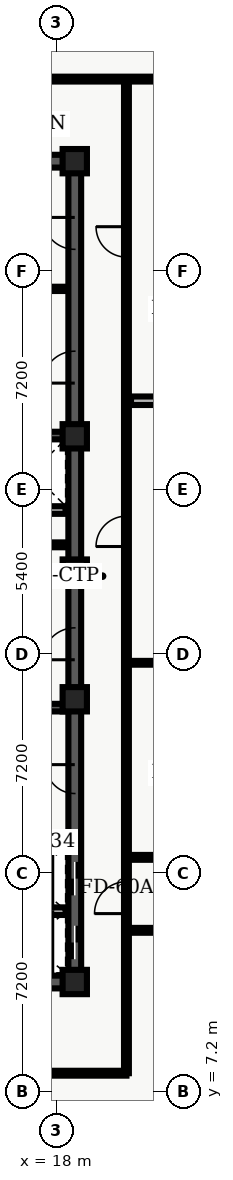
"""IFC4 building model, lengths in metres.
Left out: names, types, materials, properties, quantities, classifications, styles, units other than length and angle.
Written with IfcOpenShell. Run it as: python <this file> out.ifc"""

import sys

from ifc_helpers import new_model, entity, si_unit, converted_unit, direction, frame, origin_with_axes, origin_2d_with_axis, place, context, subcontext, project, spatial, polyline, rectangle, outline, extrude, element, fill, save


model = new_model("IFC4")
c1 = context("Model", 3, precision=1e-05, world=origin_with_axes(), true_north=direction((0.0, 1.0)))
c2 = subcontext(c1, "Body", "Model", "MODEL_VIEW")
j1 = project(units=[si_unit("LENGTHUNIT", "METRE"), converted_unit("PLANEANGLEUNIT", "DEGREE", entity("IfcPlaneAngleMeasure", 0.017), si_unit("PLANEANGLEUNIT", "RADIAN"), dimensions=[0, 0, 0, 0, 0, 0, 0])], contexts=[c1])
p1 = place(None, origin_with_axes())
s1 = spatial("IfcSite", under=j1, at=p1, CompositionType="ELEMENT")
p2 = place(p1, origin_with_axes())
s2 = spatial("IfcBuilding", under=s1, at=p2, CompositionType="ELEMENT")
p3 = place(p2, frame((0.0, 0.0, 252.9), z_axis=(0.0, 0.0, 1.0), x_axis=(1.0, 0.0, 0.0)))
s3 = spatial("IfcBuildingStorey", under=s2, at=p3, CompositionType="ELEMENT", Elevation=252.9)
p4 = place(p3, frame((11.4, 10.8, 0.0), z_axis=(0.0, 0.0, 1.0), x_axis=(1.0, 0.0, 0.0)))
e1 = element("IfcWall", 1, at=p4, inside=s3, PredefinedType="SHEAR", context=c2, shape_type="SweptSolid", body=[
    extrude(outline(polyline([(0.0, -0.21), (7.2, -0.21), (7.2, 0.21), (0.0, 0.21), (0.0, -0.21)])), origin_with_axes(), (0.0, 0.0, 1.0), 3.66),
])
p5 = place(p4, frame((2.625, 0.0, 0.0), z_axis=(0.0, 0.0, 1.0), x_axis=(1.0, 0.0, 0.0)))
e2 = element("IfcOpeningElement", 2, at=p5, cuts=e1, PredefinedType="OPENING", context=c2, shape_type="SweptSolid", body=[
    extrude(rectangle(XDim=1.05, YDim=0.44, at=origin_2d_with_axis()), origin_with_axes(), (0.0, 0.0, 1.0), 2.15),
])
p6 = place(p3, frame((11.4, 37.8, 0.0), z_axis=(0.0, 0.0, 1.0), x_axis=(1.0, 0.0, 0.0)))
e3 = element("IfcWall", 3, at=p6, inside=s3, PredefinedType="SHEAR", context=c2, shape_type="SweptSolid", body=[
    extrude(outline(polyline([(0.0, -0.21), (7.2, -0.21), (7.2, 0.21), (0.0, 0.21), (0.0, -0.21)])), origin_with_axes(), (0.0, 0.0, 1.0), 3.66),
])
p7 = place(p6, frame((2.625, 0.0, 0.0), z_axis=(0.0, 0.0, 1.0), x_axis=(1.0, 0.0, 0.0)))
e4 = element("IfcOpeningElement", 4, at=p7, cuts=e3, PredefinedType="OPENING", context=c2, shape_type="SweptSolid", body=[
    extrude(rectangle(XDim=1.05, YDim=0.44, at=origin_2d_with_axis()), origin_with_axes(), (0.0, 0.0, 1.0), 2.15),
])
p8 = place(p3, frame((18.6, 10.8, 0.0), z_axis=(0.0, 0.0, 1.0), x_axis=(0.0, 1.0, 0.0)))
e5 = element("IfcWall", 5, at=p8, inside=s3, PredefinedType="SHEAR", context=c2, shape_type="SweptSolid", body=[
    extrude(outline(polyline([(0.0, -0.21), (13.5, -0.21), (13.5, 0.21), (0.0, 0.21), (0.0, -0.21)])), origin_with_axes(), (0.0, 0.0, 1.0), 3.66),
])
p9 = place(p8, frame((1.3, 0.0, 0.0), z_axis=(0.0, 0.0, 1.0), x_axis=(1.0, 0.0, 0.0)))
e6 = element("IfcOpeningElement", 6, at=p9, cuts=e5, PredefinedType="OPENING", context=c2, shape_type="SweptSolid", body=[
    extrude(rectangle(XDim=1.1, YDim=0.44, at=origin_2d_with_axis()), origin_with_axes(), (0.0, 0.0, 1.0), 2.15),
])
p10 = place(p8, frame((3.4, 0.0, 0.0), z_axis=(0.0, 0.0, 1.0), x_axis=(1.0, 0.0, 0.0)))
e7 = element("IfcOpeningElement", 7, at=p10, cuts=e5, PredefinedType="OPENING", context=c2, shape_type="SweptSolid", body=[
    extrude(rectangle(XDim=1.1, YDim=0.44, at=origin_2d_with_axis()), origin_with_axes(), (0.0, 0.0, 1.0), 2.15),
])
p11 = place(p8, frame((11.125, 0.0, 0.0), z_axis=(0.0, 0.0, 1.0), x_axis=(1.0, 0.0, 0.0)))
e8 = element("IfcOpeningElement", 8, at=p11, cuts=e5, PredefinedType="OPENING", context=c2, shape_type="SweptSolid", body=[
    extrude(rectangle(XDim=1.05, YDim=0.44, at=origin_2d_with_axis()), origin_with_axes(), (0.0, 0.0, 1.0), 2.15),
])
p12 = place(p8, frame((6.675, 0.0, 0.0), z_axis=(0.0, 0.0, 1.0), x_axis=(1.0, 0.0, 0.0)))
e9 = element("IfcOpeningElement", 9, at=p12, cuts=e5, PredefinedType="OPENING", context=c2, shape_type="SweptSolid", body=[
    extrude(rectangle(XDim=0.95, YDim=0.44, at=origin_2d_with_axis()), origin_with_axes(), (0.0, 0.0, 1.0), 2.15),
])
p13 = place(p3, frame((18.6, 24.3, 0.0), z_axis=(0.0, 0.0, 1.0), x_axis=(0.0, 1.0, 0.0)))
e10 = element("IfcWall", 10, at=p13, inside=s3, PredefinedType="SHEAR", context=c2, shape_type="SweptSolid", body=[
    extrude(outline(polyline([(0.0, -0.21), (13.5, -0.21), (13.5, 0.21), (0.0, 0.21), (0.0, -0.21)])), origin_with_axes(), (0.0, 0.0, 1.0), 3.66),
])
p14 = place(p13, frame((6.725, 0.0, 0.0), z_axis=(0.0, 0.0, 1.0), x_axis=(1.0, 0.0, 0.0)))
e11 = element("IfcOpeningElement", 11, at=p14, cuts=e10, PredefinedType="OPENING", context=c2, shape_type="SweptSolid", body=[
    extrude(rectangle(XDim=1.05, YDim=0.44, at=origin_2d_with_axis()), origin_with_axes(), (0.0, 0.0, 1.0), 2.15),
])
p15 = place(p13, frame((11.125, 0.0, 0.0), z_axis=(0.0, 0.0, 1.0), x_axis=(1.0, 0.0, 0.0)))
e12 = element("IfcOpeningElement", 12, at=p15, cuts=e10, PredefinedType="OPENING", context=c2, shape_type="SweptSolid", body=[
    extrude(rectangle(XDim=1.05, YDim=0.44, at=origin_2d_with_axis()), origin_with_axes(), (0.0, 0.0, 1.0), 2.15),
])
for number, where, z_axis, x_axis in (
    (13, (11.61, 19.825, 0.0), (0.0, 0.0, 1.0), (1.0, 0.0, 0.0)),
    (14, (11.61, 28.775, 0.0), (0.0, 0.0, 1.0), (1.0, 0.0, 0.0)),
):
    element("IfcWall", number, at=place(p3, frame(where, z_axis=z_axis, x_axis=x_axis)), inside=s3, PredefinedType="SHEAR", context=c2, shape_type="SweptSolid", body=[
        extrude(outline(polyline([(0.0, -0.125), (6.78, -0.125), (6.78, 0.125), (0.0, 0.125), (0.0, -0.125)])), origin_with_axes(), (0.0, 0.0, 1.0), 3.66),
    ])
p16 = place(p3, frame((11.7, 24.1, 0.0), z_axis=(0.0, 0.0, 1.0), x_axis=(1.0, 0.0, 0.0)))
e15 = element("IfcWall", 15, at=p16, inside=s3, PredefinedType="SOLIDWALL", context=c2, shape_type="SweptSolid", body=[
    extrude(outline(polyline([(0.0, -0.125), (6.6, -0.125), (6.6, 0.125), (0.0, 0.125), (0.0, -0.125)])), origin_with_axes(), (0.0, 0.0, 1.0), 2.7),
])
p17 = place(p16, frame((3.75, 0.0, 0.0), z_axis=(0.0, 0.0, 1.0), x_axis=(1.0, 0.0, 0.0)))
e16 = element("IfcOpeningElement", 16, at=p17, cuts=e15, PredefinedType="OPENING", context=c2, shape_type="SweptSolid", body=[
    extrude(rectangle(XDim=0.9, YDim=0.27, at=origin_2d_with_axis()), origin_with_axes(), (0.0, 0.0, 1.0), 2.15),
])
p18 = place(p3, frame((11.7, 26.325, 0.0), z_axis=(0.0, 0.0, 1.0), x_axis=(1.0, 0.0, 0.0)))
e17 = element("IfcWall", 17, at=p18, inside=s3, PredefinedType="SOLIDWALL", context=c2, shape_type="SweptSolid", body=[
    extrude(outline(polyline([(0.0, -0.125), (6.6, -0.125), (6.6, 0.125), (0.0, 0.125), (0.0, -0.125)])), origin_with_axes(), (0.0, 0.0, 1.0), 2.7),
])
p19 = place(p18, frame((3.5, 0.0, 0.0), z_axis=(0.0, 0.0, 1.0), x_axis=(1.0, 0.0, 0.0)))
e18 = element("IfcOpeningElement", 18, at=p19, cuts=e17, PredefinedType="OPENING", context=c2, shape_type="SweptSolid", body=[
    extrude(rectangle(XDim=0.9, YDim=0.27, at=origin_2d_with_axis()), origin_with_axes(), (0.0, 0.0, 1.0), 2.15),
])
for number, where, z_axis, x_axis in (
    (19, (18.6, 10.8, 0.0), (0.0, 0.0, 1.0), (1.0, 0.0, 0.0)),
    (20, (18.6, 20.1, 0.0), (0.0, 0.0, 1.0), (1.0, 0.0, 0.0)),
    (21, (18.6, 24.3, 0.0), (0.0, 0.0, 1.0), (1.0, 0.0, 0.0)),
    (22, (18.6, 28.75, 0.0), (0.0, 0.0, 1.0), (1.0, 0.0, 0.0)),
    (23, (18.6, 37.8, 0.0), (0.0, 0.0, 1.0), (1.0, 0.0, 0.0)),
):
    element("IfcColumn", number, at=place(p3, frame(where, z_axis=z_axis, x_axis=x_axis)), inside=s3, PredefinedType="COLUMN", context=c2, shape_type="SweptSolid", body=[
        extrude(rectangle(XDim=0.8, YDim=0.8, at=origin_2d_with_axis()), origin_with_axes(), (0.0, 0.0, 1.0), 3.9),
    ])
p20 = place(p3, frame((14.62, 25.18, 0.0), z_axis=(0.0, 0.0, 1.0), x_axis=(1.0, 0.0, 0.0)))
e24 = element("IfcWall", 24, at=p20, inside=s3, PredefinedType="PARTITIONING", context=c2, shape_type="SweptSolid", body=[
    extrude(outline(polyline([(0.0, -0.08), (3.68, -0.08), (3.68, 0.08), (0.0, 0.08), (0.0, -0.08)])), origin_with_axes(), (0.0, 0.0, 1.0), 2.7),
])
p21 = place(p20, frame((1.95, 0.0, 0.0), z_axis=(0.0, 0.0, 1.0), x_axis=(1.0, 0.0, 0.0)))
e25 = element("IfcOpeningElement", 25, at=p21, cuts=e24, PredefinedType="OPENING", context=c2, shape_type="SweptSolid", body=[
    extrude(rectangle(XDim=0.9, YDim=0.18, at=origin_2d_with_axis()), origin_with_axes(), (0.0, 0.0, 1.0), 2.15),
])
for number, where, z_axis, x_axis in (
    (26, (15.84, 13.13, 0.0), (0.0, 0.0, 1.0), (1.0, 0.0, 0.0)),
    (27, (15.84, 15.27, 0.0), (0.0, 0.0, 1.0), (1.0, 0.0, 0.0)),
):
    element("IfcWall", number, at=place(p3, frame(where, z_axis=z_axis, x_axis=x_axis)), inside=s3, PredefinedType="SOLIDWALL", context=c2, shape_type="SweptSolid", body=[
        extrude(outline(polyline([(0.0, -0.125), (2.46, -0.125), (2.46, 0.125), (0.0, 0.125), (0.0, -0.125)])), origin_with_axes(), (0.0, 0.0, 1.0), 2.7),
    ])
p22 = place(p3, frame((15.84, 33.6, 0.0), z_axis=(0.0, 0.0, 1.0), x_axis=(1.0, 0.0, 0.0)))
e28 = element("IfcWall", 28, at=p22, inside=s3, PredefinedType="PARTITIONING", context=c2, shape_type="SweptSolid", body=[
    extrude(outline(polyline([(0.0, -0.07), (2.46, -0.07), (2.46, 0.07), (0.0, 0.07), (0.0, -0.07)])), origin_with_axes(), (0.0, 0.0, 1.0), 2.7),
])
p23 = place(p3, frame((8.135, 7.8, 0.0), z_axis=(0.0, 0.0, 1.0), x_axis=(1.0, 0.0, 0.0)))
e29 = element("IfcWall", 29, at=p23, inside=s3, PredefinedType="PARTITIONING", context=c2, shape_type="SweptSolid", body=[
    extrude(outline(polyline([(0.0, -0.08), (12.165, -0.08), (12.165, 0.08), (0.0, 0.08), (0.0, -0.08)])), origin_with_axes(), (0.0, 0.0, 1.0), 2.7),
])
p24 = place(p23, frame((3.979, 0.0, 0.0), z_axis=(0.0, 0.0, 1.0), x_axis=(1.0, 0.0, 0.0)))
e30 = element("IfcOpeningElement", 30, at=p24, cuts=e29, PredefinedType="OPENING", context=c2, shape_type="SweptSolid", body=[
    extrude(rectangle(XDim=1.0, YDim=0.18, at=origin_2d_with_axis()), origin_with_axes(), (0.0, 0.0, 1.0), 2.15),
])
p25 = place(p23, frame((8.778, 0.0, 0.0), z_axis=(0.0, 0.0, 1.0), x_axis=(1.0, 0.0, 0.0)))
e31 = element("IfcOpeningElement", 31, at=p25, cuts=e29, PredefinedType="OPENING", context=c2, shape_type="SweptSolid", body=[
    extrude(rectangle(XDim=1.0, YDim=0.18, at=origin_2d_with_axis()), origin_with_axes(), (0.0, 0.0, 1.0), 2.15),
])
p26 = place(p3, frame((8.135, 40.5, 0.0), z_axis=(0.0, 0.0, 1.0), x_axis=(1.0, 0.0, 0.0)))
e32 = element("IfcWall", 32, at=p26, inside=s3, PredefinedType="PARTITIONING", context=c2, shape_type="SweptSolid", body=[
    extrude(outline(polyline([(0.0, -0.08), (23.93, -0.08), (23.93, 0.08), (0.0, 0.08), (0.0, -0.08)])), origin_with_axes(), (0.0, 0.0, 1.0), 2.7),
])
p27 = place(p26, frame((0.76, 0.0, 0.0), z_axis=(0.0, 0.0, 1.0), x_axis=(1.0, 0.0, 0.0)))
e33 = element("IfcOpeningElement", 33, at=p27, cuts=e32, PredefinedType="OPENING", context=c2, shape_type="SweptSolid", body=[
    extrude(rectangle(XDim=1.0, YDim=0.18, at=origin_2d_with_axis()), origin_with_axes(), (0.0, 0.0, 1.0), 2.15),
])
p28 = place(p26, frame((7.625, 0.0, 0.0), z_axis=(0.0, 0.0, 1.0), x_axis=(1.0, 0.0, 0.0)))
e34 = element("IfcOpeningElement", 34, at=p28, cuts=e32, PredefinedType="OPENING", context=c2, shape_type="SweptSolid", body=[
    extrude(rectangle(XDim=1.0, YDim=0.18, at=origin_2d_with_axis()), origin_with_axes(), (0.0, 0.0, 1.0), 2.15),
])
p29 = place(p3, frame((20.3, 7.8, 0.0), z_axis=(0.0, 0.0, 1.0), x_axis=(0.0, 1.0, 0.0)))
e35 = element("IfcWall", 35, at=p29, inside=s3, PredefinedType="PARTITIONING", context=c2, shape_type="SweptSolid", body=[
    extrude(outline(polyline([(0.0, -0.08), (32.7, -0.08), (32.7, 0.08), (0.0, 0.08), (0.0, -0.08)])), origin_with_axes(), (0.0, 0.0, 1.0), 2.7),
])
p30 = place(p29, frame((17.825, 0.0, 0.0), z_axis=(0.0, 0.0, 1.0), x_axis=(1.0, 0.0, 0.0)))
e36 = element("IfcOpeningElement", 36, at=p30, cuts=e35, PredefinedType="OPENING", context=c2, shape_type="SweptSolid", body=[
    extrude(rectangle(XDim=1.0, YDim=0.18, at=origin_2d_with_axis()), origin_with_axes(), (0.0, 0.0, 1.0), 2.15),
])
p31 = place(p29, frame((27.345, 0.0, 0.0), z_axis=(0.0, 0.0, 1.0), x_axis=(1.0, 0.0, 0.0)))
e37 = element("IfcOpeningElement", 37, at=p31, cuts=e35, PredefinedType="OPENING", context=c2, shape_type="SweptSolid", body=[
    extrude(rectangle(XDim=1.0, YDim=0.18, at=origin_2d_with_axis()), origin_with_axes(), (0.0, 0.0, 1.0), 2.15),
])
p32 = place(p29, frame((5.775, 0.0, 0.0), z_axis=(0.0, 0.0, 1.0), x_axis=(1.0, 0.0, 0.0)))
e38 = element("IfcOpeningElement", 38, at=p32, cuts=e35, PredefinedType="OPENING", context=c2, shape_type="SweptSolid", body=[
    extrude(rectangle(XDim=1.05, YDim=0.18, at=origin_2d_with_axis()), origin_with_axes(), (0.0, 0.0, 1.0), 2.15),
])
p33 = place(p3, frame((20.45, 29.92, 0.0), z_axis=(0.0, 0.0, 1.0), x_axis=(1.0, 0.0, 0.0)))
e39 = element("IfcWall", 39, at=p33, inside=s3, PredefinedType="PARTITIONING", context=c2, shape_type="SweptSolid", body=[
    extrude(outline(polyline([(0.0, -0.14), (11.615, -0.14), (11.615, 0.14), (0.0, 0.14), (0.0, -0.14)])), origin_with_axes(), (0.0, 0.0, 1.0), 2.7),
])
p34 = place(p3, frame((20.3, 12.5, 0.0), z_axis=(0.0, 0.0, 1.0), x_axis=(1.0, 0.0, 0.0)))
e40 = element("IfcWall", 40, at=p34, inside=s3, PredefinedType="PARTITIONING", context=c2, shape_type="SweptSolid", body=[
    extrude(outline(polyline([(0.0, -0.08), (16.05, -0.08), (16.05, 0.08), (0.0, 0.08), (0.0, -0.08)])), origin_with_axes(), (0.0, 0.0, 1.0), 2.7),
])
p35 = place(p34, frame((3.662, 0.0, 0.0), z_axis=(0.0, 0.0, 1.0), x_axis=(1.0, 0.0, 0.0)))
e41 = element("IfcOpeningElement", 41, at=p35, cuts=e40, PredefinedType="OPENING", context=c2, shape_type="SweptSolid", body=[
    extrude(rectangle(XDim=1.0, YDim=0.18, at=origin_2d_with_axis()), origin_with_axes(), (0.0, 0.0, 1.0), 2.15),
])
p36 = place(p34, frame((11.557, 0.0, 0.0), z_axis=(0.0, 0.0, 1.0), x_axis=(1.0, 0.0, 0.0)))
e42 = element("IfcOpeningElement", 42, at=p36, cuts=e40, PredefinedType="OPENING", context=c2, shape_type="SweptSolid", body=[
    extrude(rectangle(XDim=1.0, YDim=0.18, at=origin_2d_with_axis()), origin_with_axes(), (0.0, 0.0, 1.0), 2.15),
])
p37 = place(p3, frame((20.3, 14.9, 0.0), z_axis=(0.0, 0.0, 1.0), x_axis=(1.0, 0.0, 0.0)))
e43 = element("IfcWall", 43, at=p37, inside=s3, PredefinedType="PARTITIONING", context=c2, shape_type="SweptSolid", body=[
    extrude(outline(polyline([(0.0, -0.08), (16.05, -0.08), (16.05, 0.08), (0.0, 0.08), (0.0, -0.08)])), origin_with_axes(), (0.0, 0.0, 1.0), 2.7),
])
p38 = place(p37, frame((3.759, 0.0, 0.0), z_axis=(0.0, 0.0, 1.0), x_axis=(1.0, 0.0, 0.0)))
e44 = element("IfcOpeningElement", 44, at=p38, cuts=e43, PredefinedType="OPENING", context=c2, shape_type="SweptSolid", body=[
    extrude(rectangle(XDim=1.0, YDim=0.18, at=origin_2d_with_axis()), origin_with_axes(), (0.0, 0.0, 1.0), 2.15),
])
p39 = place(p37, frame((11.654, 0.0, 0.0), z_axis=(0.0, 0.0, 1.0), x_axis=(1.0, 0.0, 0.0)))
e45 = element("IfcOpeningElement", 45, at=p39, cuts=e43, PredefinedType="OPENING", context=c2, shape_type="SweptSolid", body=[
    extrude(rectangle(XDim=1.0, YDim=0.18, at=origin_2d_with_axis()), origin_with_axes(), (0.0, 0.0, 1.0), 2.15),
])
p40 = place(p3, frame((20.3, 21.3, 0.0), z_axis=(0.0, 0.0, 1.0), x_axis=(1.0, 0.0, 0.0)))
e46 = element("IfcWall", 46, at=p40, inside=s3, PredefinedType="PARTITIONING", context=c2, shape_type="SweptSolid", body=[
    extrude(outline(polyline([(0.0, -0.062), (11.765, -0.062), (11.765, 0.062), (0.0, 0.062), (0.0, -0.062)])), origin_with_axes(), (0.0, 0.0, 1.0), 2.7),
])
p41 = place(p8, frame((1.3, 0.0, 0.0), z_axis=(0.0, 0.0, 1.0), x_axis=(1.0, 0.0, 0.0)))
e47 = element("IfcDoor", 47, at=p41, inside=s3, OperationType="SLIDING_TO_LEFT", PredefinedType="DOOR", context=c2, shape_type="SweptSolid", body=[
    extrude(rectangle(XDim=1.1, YDim=0.09, at=origin_2d_with_axis()), origin_with_axes(), (0.0, 0.0, 1.0), 2.15),
])
fill(e6, e47)
p42 = place(p8, frame((3.4, 0.0, 0.0), z_axis=(0.0, 0.0, 1.0), x_axis=(1.0, 0.0, 0.0)))
e48 = element("IfcDoor", 48, at=p42, inside=s3, OperationType="SLIDING_TO_RIGHT", PredefinedType="DOOR", context=c2, shape_type="SweptSolid", body=[
    extrude(rectangle(XDim=1.1, YDim=0.09, at=origin_2d_with_axis()), origin_with_axes(), (0.0, 0.0, 1.0), 2.15),
])
fill(e7, e48)
p43 = place(p8, frame((11.125, 0.0, 0.0), z_axis=(0.0, 0.0, 1.0), x_axis=(1.0, 0.0, 0.0)))
e49 = element("IfcDoor", 49, at=p43, inside=s3, OperationType="SINGLE_SWING_LEFT", PredefinedType="DOOR", context=c2, shape_type="SweptSolid", body=[
    extrude(rectangle(XDim=1.05, YDim=0.09, at=origin_2d_with_axis()), origin_with_axes(), (0.0, 0.0, 1.0), 2.15),
])
fill(e8, e49)
p44 = place(p8, frame((6.675, 0.0, 0.0), z_axis=(0.0, 0.0, 1.0), x_axis=(1.0, 0.0, 0.0)))
e50 = element("IfcDoor", 50, at=p44, inside=s3, OperationType="SINGLE_SWING_RIGHT", PredefinedType="DOOR", context=c2, shape_type="SweptSolid", body=[
    extrude(rectangle(XDim=0.95, YDim=0.09, at=origin_2d_with_axis()), origin_with_axes(), (0.0, 0.0, 1.0), 2.15),
])
fill(e9, e50)
p45 = place(p13, frame((6.725, 0.0, 0.0), z_axis=(0.0, 0.0, 1.0), x_axis=(1.0, 0.0, 0.0)))
e51 = element("IfcDoor", 51, at=p45, inside=s3, OperationType="SINGLE_SWING_LEFT", PredefinedType="DOOR", context=c2, shape_type="SweptSolid", body=[
    extrude(rectangle(XDim=1.05, YDim=0.09, at=origin_2d_with_axis()), origin_with_axes(), (0.0, 0.0, 1.0), 2.15),
])
fill(e11, e51)
p46 = place(p13, frame((11.125, 0.0, 0.0), z_axis=(0.0, 0.0, 1.0), x_axis=(1.0, 0.0, 0.0)))
e52 = element("IfcDoor", 52, at=p46, inside=s3, OperationType="SINGLE_SWING_RIGHT", PredefinedType="DOOR", context=c2, shape_type="SweptSolid", body=[
    extrude(rectangle(XDim=1.05, YDim=0.09, at=origin_2d_with_axis()), origin_with_axes(), (0.0, 0.0, 1.0), 2.15),
])
fill(e12, e52)
p47 = place(p29, frame((17.825, 0.0, 0.0), z_axis=(0.0, 0.0, 1.0), x_axis=(1.0, 0.0, 0.0)))
e53 = element("IfcDoor", 53, at=p47, inside=s3, OperationType="SINGLE_SWING_LEFT", PredefinedType="DOOR", context=c2, shape_type="SweptSolid", body=[
    extrude(rectangle(XDim=1.0, YDim=0.09, at=origin_2d_with_axis()), origin_with_axes(), (0.0, 0.0, 1.0), 2.15),
])
fill(e36, e53)
p48 = place(p29, frame((27.345, 0.0, 0.0), z_axis=(0.0, 0.0, 1.0), x_axis=(1.0, 0.0, 0.0)))
e54 = element("IfcDoor", 54, at=p48, inside=s3, OperationType="SINGLE_SWING_RIGHT", PredefinedType="DOOR", context=c2, shape_type="SweptSolid", body=[
    extrude(rectangle(XDim=1.0, YDim=0.09, at=origin_2d_with_axis()), origin_with_axes(), (0.0, 0.0, 1.0), 2.15),
])
fill(e37, e54)
p49 = place(p29, frame((5.775, 0.0, 0.0), z_axis=(0.0, 0.0, 1.0), x_axis=(1.0, 0.0, 0.0)))
e55 = element("IfcDoor", 55, at=p49, inside=s3, OperationType="SINGLE_SWING_LEFT", PredefinedType="DOOR", context=c2, shape_type="SweptSolid", body=[
    extrude(rectangle(XDim=1.05, YDim=0.09, at=origin_2d_with_axis()), origin_with_axes(), (0.0, 0.0, 1.0), 2.15),
])
fill(e38, e55)
save(model, sys.argv[1])
